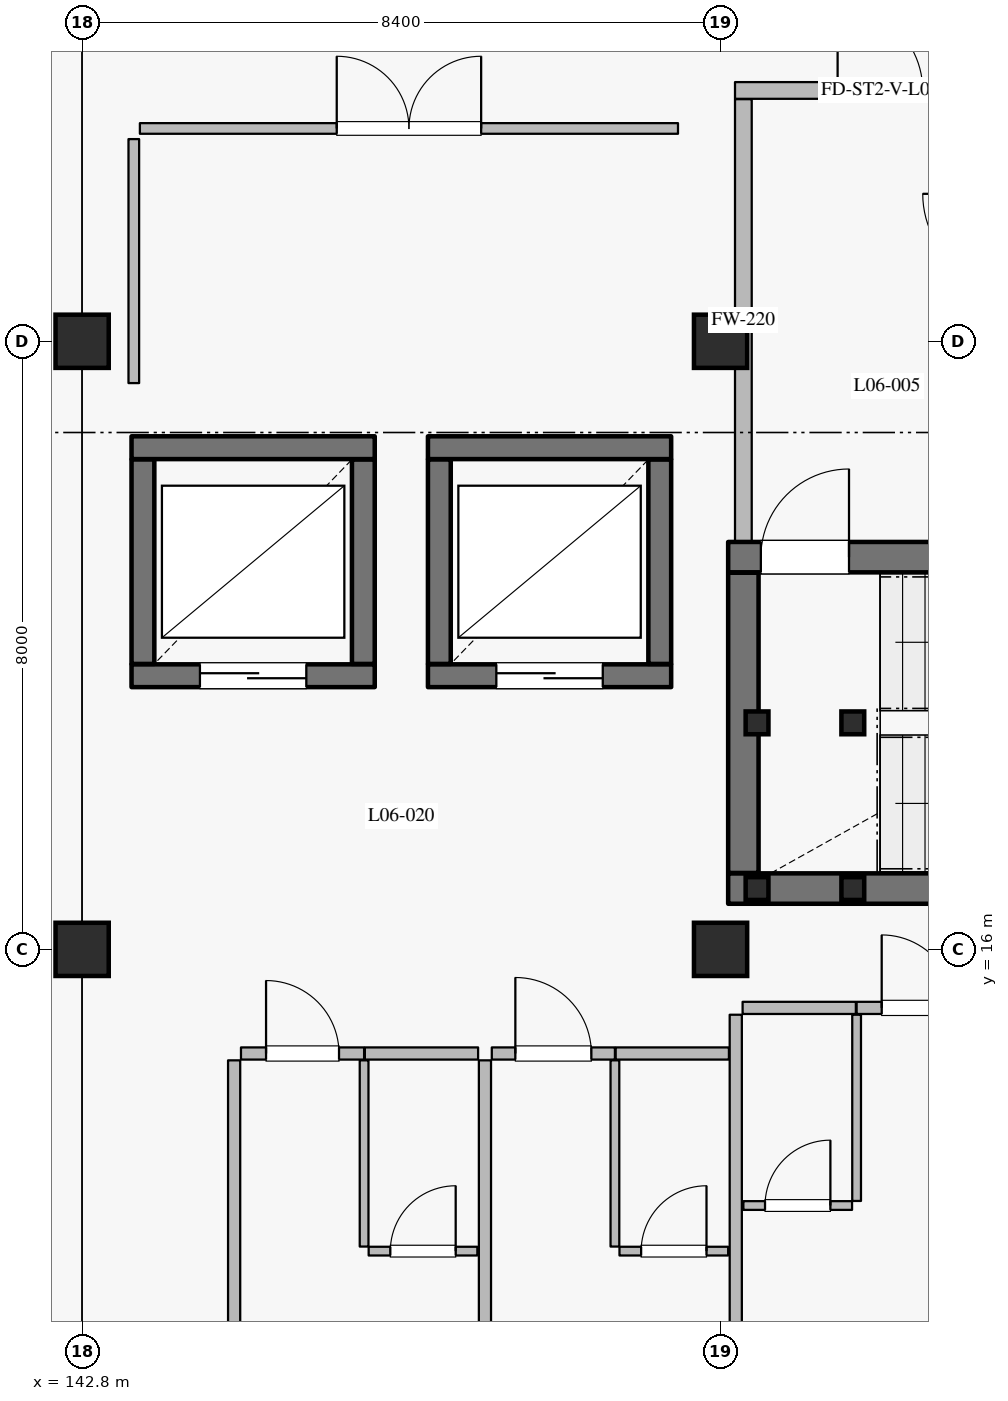
"""IFC4 building model, lengths in metres.
Left out: names, types, materials, properties, quantities, classifications, styles, units other than length and angle.
Written with IfcOpenShell. Run it as: python <this file> out.ifc"""

import sys

from ifc_helpers import new_model, si_unit, direction, frame, frame_2d, origin, origin_2d, place, context, subcontext, project, spatial, rectangle, hollow_rectangle, extrude, element, fill, save


model = new_model("IFC4")
c1 = context("Model", 3, precision=1e-05, world=origin(), true_north=direction((0.0, 1.0)))
c2 = subcontext(c1, "Body", "Model", "MODEL_VIEW")
j1 = project(units=[si_unit("LENGTHUNIT", "METRE"), si_unit("PLANEANGLEUNIT", "RADIAN")], contexts=[c1])
p1 = place(None, origin())
s1 = spatial("IfcSite", under=j1, at=p1, CompositionType="ELEMENT")
p2 = place(p1, origin())
s2 = spatial("IfcBuilding", under=s1, at=p2, CompositionType="ELEMENT")
p3 = place(p2, frame((0.0, 0.0, 28.8)))
s3 = spatial("IfcBuildingStorey", under=s2, at=p3, CompositionType="ELEMENT", Elevation=28.8)
for number, where, z_axis, x_axis in (
    (1, (142.8, 16.0, 0.0), (0.0, 0.0, 1.0), (1.0, 0.0, 0.0)),
    (2, (151.2, 24.0, 0.0), (0.0, 0.0, 1.0), (1.0, 0.0, 0.0)),
    (3, (142.8, 24.0, 0.0), (0.0, 0.0, 1.0), (1.0, 0.0, 0.0)),
    (4, (151.2, 16.0, 0.0), (0.0, 0.0, 1.0), (1.0, 0.0, 0.0)),
):
    element("IfcColumn", number, at=place(p3, frame(where, z_axis=z_axis, x_axis=x_axis)), inside=s3, PredefinedType="COLUMN", context=c2, shape_type="SweptSolid", body=[
        extrude(rectangle(XDim=0.7, YDim=0.7, at=origin_2d()), origin(), (0.0, 0.0, 1.0), 3.6),
    ])
p4 = place(p3, frame((143.45, 19.6, 0.0), z_axis=(0.0, 0.0, 1.0), x_axis=(1.0, 0.0, 0.0)))
e5 = element("IfcWall", 5, at=p4, inside=s3, PredefinedType="SHEAR", context=c2, shape_type="SweptSolid", body=[
    extrude(rectangle(XDim=3.2, YDim=0.3, at=frame_2d((1.6, 0.0))), origin(), (0.0, 0.0, 1.0), 3.365),
])
p5 = place(p4, frame((0.9, 0.0, 0.0)))
e6 = element("IfcOpeningElement", 6, at=p5, cuts=e5, PredefinedType="OPENING", context=c2, shape_type="SweptSolid", body=[
    extrude(rectangle(XDim=1.4, YDim=2.35, at=frame_2d((0.7, 1.175))), frame((0.0, 0.16, 0.0), z_axis=(0.0, -1.0, 0.0), x_axis=(1.0, 0.0, 0.0)), (0.0, 0.0, 1.0), 0.32),
])
p6 = place(p3, frame((146.5, 19.755, 0.0), z_axis=(0.0, 0.0, 1.0), x_axis=(0.0, 1.0, 0.0)))
e7 = element("IfcWall", 7, at=p6, inside=s3, PredefinedType="SHEAR", context=c2, shape_type="SweptSolid", body=[
    extrude(rectangle(XDim=2.69, YDim=0.3, at=frame_2d((1.345, 0.0))), origin(), (0.0, 0.0, 1.0), 3.365),
])
p7 = place(p3, frame((146.65, 22.6, 0.0), z_axis=(0.0, 0.0, 1.0), x_axis=(-1.0, 0.0, 0.0)))
e8 = element("IfcWall", 8, at=p7, inside=s3, PredefinedType="SHEAR", context=c2, shape_type="SweptSolid", body=[
    extrude(rectangle(XDim=3.2, YDim=0.3, at=frame_2d((1.6, 0.0))), origin(), (0.0, 0.0, 1.0), 3.365),
])
p8 = place(p3, frame((143.6, 22.445, 0.0), z_axis=(0.0, 0.0, 1.0), x_axis=(0.0, -1.0, 0.0)))
e9 = element("IfcWall", 9, at=p8, inside=s3, PredefinedType="SHEAR", context=c2, shape_type="SweptSolid", body=[
    extrude(rectangle(XDim=2.69, YDim=0.3, at=frame_2d((1.345, 0.0))), origin(), (0.0, 0.0, 1.0), 3.365),
])
p9 = place(p3, frame((147.35, 19.6, 0.0), z_axis=(0.0, 0.0, 1.0), x_axis=(1.0, 0.0, 0.0)))
e10 = element("IfcWall", 10, at=p9, inside=s3, PredefinedType="SHEAR", context=c2, shape_type="SweptSolid", body=[
    extrude(rectangle(XDim=3.2, YDim=0.3, at=frame_2d((1.6, 0.0))), origin(), (0.0, 0.0, 1.0), 3.365),
])
p10 = place(p9, frame((0.9, 0.0, 0.0)))
e11 = element("IfcOpeningElement", 11, at=p10, cuts=e10, PredefinedType="OPENING", context=c2, shape_type="SweptSolid", body=[
    extrude(rectangle(XDim=1.4, YDim=2.35, at=frame_2d((0.7, 1.175))), frame((0.0, 0.16, 0.0), z_axis=(0.0, -1.0, 0.0), x_axis=(1.0, 0.0, 0.0)), (0.0, 0.0, 1.0), 0.32),
])
p11 = place(p3, frame((150.4, 19.755, 0.0), z_axis=(0.0, 0.0, 1.0), x_axis=(0.0, 1.0, 0.0)))
e12 = element("IfcWall", 12, at=p11, inside=s3, PredefinedType="SHEAR", context=c2, shape_type="SweptSolid", body=[
    extrude(rectangle(XDim=2.69, YDim=0.3, at=frame_2d((1.345, 0.0))), origin(), (0.0, 0.0, 1.0), 3.365),
])
p12 = place(p3, frame((150.55, 22.6, 0.0), z_axis=(0.0, 0.0, 1.0), x_axis=(-1.0, 0.0, 0.0)))
e13 = element("IfcWall", 13, at=p12, inside=s3, PredefinedType="SHEAR", context=c2, shape_type="SweptSolid", body=[
    extrude(rectangle(XDim=3.2, YDim=0.3, at=frame_2d((1.6, 0.0))), origin(), (0.0, 0.0, 1.0), 3.365),
])
p13 = place(p3, frame((147.5, 22.445, 0.0), z_axis=(0.0, 0.0, 1.0), x_axis=(0.0, -1.0, 0.0)))
e14 = element("IfcWall", 14, at=p13, inside=s3, PredefinedType="SHEAR", context=c2, shape_type="SweptSolid", body=[
    extrude(rectangle(XDim=2.69, YDim=0.3, at=frame_2d((1.345, 0.0))), origin(), (0.0, 0.0, 1.0), 3.365),
])
p14 = place(p3, frame((151.3, 16.8, 0.0), z_axis=(0.0, 0.0, 1.0), x_axis=(1.0, 0.0, 0.0)))
e15 = element("IfcWall", 15, at=p14, inside=s3, PredefinedType="SHEAR", context=c2, shape_type="SweptSolid", body=[
    extrude(rectangle(XDim=8.2, YDim=0.4, at=frame_2d((4.1, 0.0))), origin(), (0.0, 0.0, 1.0), 3.365),
])
p15 = place(p3, frame((151.3, 21.16, 0.0), z_axis=(0.0, 0.0, 1.0), x_axis=(1.0, 0.0, 0.0)))
e16 = element("IfcWall", 16, at=p15, inside=s3, PredefinedType="SHEAR", context=c2, shape_type="SweptSolid", body=[
    extrude(rectangle(XDim=8.2, YDim=0.4, at=frame_2d((4.1, 0.0))), origin(), (0.0, 0.0, 1.0), 3.365),
])
p16 = place(p15, frame((0.43, 0.0, 0.0)))
e17 = element("IfcOpeningElement", 17, at=p16, cuts=e16, PredefinedType="OPENING", context=c2, shape_type="SweptSolid", body=[
    extrude(rectangle(XDim=1.16, YDim=2.2, at=frame_2d((0.58, 1.1))), frame((0.0, 0.21, 0.0), z_axis=(0.0, -1.0, 0.0), x_axis=(1.0, 0.0, 0.0)), (0.0, 0.0, 1.0), 0.42),
])
p17 = place(p3, frame((151.5, 17.005, 0.0), z_axis=(0.0, 0.0, 1.0), x_axis=(0.0, 1.0, 0.0)))
e18 = element("IfcWall", 18, at=p17, inside=s3, PredefinedType="SHEAR", context=c2, shape_type="SweptSolid", body=[
    extrude(rectangle(XDim=3.95, YDim=0.4, at=frame_2d((1.975, 0.0))), origin(), (0.0, 0.0, 1.0), 3.365),
])
p18 = place(p3, frame((151.5, 21.365, 0.0), z_axis=(0.0, 0.0, 1.0), x_axis=(0.0, 1.0, 0.0)))
e19 = element("IfcWall", 19, at=p18, inside=s3, PredefinedType="PARTITIONING", context=c2, shape_type="SweptSolid", body=[
    extrude(rectangle(XDim=5.82, YDim=0.22, at=frame_2d((2.91, 0.0))), origin(), (0.0, 0.0, 1.0), 3.365),
])
p19 = place(p3, frame((151.39, 27.3, 0.0), z_axis=(0.0, 0.0, 1.0), x_axis=(1.0, 0.0, 0.0)))
e20 = element("IfcWall", 20, at=p19, inside=s3, PredefinedType="PARTITIONING", context=c2, shape_type="SweptSolid", body=[
    extrude(rectangle(XDim=3.82, YDim=0.22, at=frame_2d((1.91, 0.0))), origin(), (0.0, 0.0, 1.0), 3.365),
])
p20 = place(p19, frame((1.35, 0.0, 0.0)))
e21 = element("IfcOpeningElement", 21, at=p20, cuts=e20, PredefinedType="OPENING", context=c2, shape_type="SweptSolid", body=[
    extrude(rectangle(XDim=1.12, YDim=2.2, at=frame_2d((0.56, 1.1))), frame((0.0, 0.12, 0.0), z_axis=(0.0, -1.0, 0.0), x_axis=(1.0, 0.0, 0.0)), (0.0, 0.0, 1.0), 0.24),
])
for number, where, z_axis, x_axis in (
    (22, (151.68, 16.8, 0.0), (0.0, 0.0, 1.0), (1.0, 0.0, 0.0)),
    (23, (151.68, 18.98, 0.0), (0.0, 0.0, 1.0), (1.0, 0.0, 0.0)),
    (24, (152.94, 16.8, 0.0), (0.0, 0.0, 1.0), (1.0, 0.0, 0.0)),
    (25, (152.94, 18.98, 0.0), (0.0, 0.0, 1.0), (1.0, 0.0, 0.0)),
):
    element("IfcColumn", number, at=place(p3, frame(where, z_axis=z_axis, x_axis=x_axis)), inside=s3, PredefinedType="COLUMN", context=c2, shape_type="SweptSolid", body=[
        extrude(hollow_rectangle(XDim=0.3, YDim=0.3, WallThickness=0.012, at=origin_2d()), origin(), (0.0, 0.0, 1.0), 3.42),
    ])
p21 = place(p3, frame((144.89, 14.63, 0.0), z_axis=(0.0, 0.0, 1.0), x_axis=(1.0, 0.0, 0.0)))
e26 = element("IfcWall", 26, at=p21, inside=s3, PredefinedType="PARTITIONING", context=c2, shape_type="SweptSolid", body=[
    extrude(rectangle(XDim=1.62, YDim=0.16, at=frame_2d((0.81, 0.0))), origin(), (0.0, 0.0, 1.0), 3.365),
])
p22 = place(p21, frame((0.33, 0.0, 0.0)))
e27 = element("IfcOpeningElement", 27, at=p22, cuts=e26, PredefinedType="OPENING", context=c2, shape_type="SweptSolid", body=[
    extrude(rectangle(XDim=0.96, YDim=2.2, at=frame_2d((0.48, 1.1))), frame((0.0, 0.09, 0.0), z_axis=(0.0, -1.0, 0.0), x_axis=(1.0, 0.0, 0.0)), (0.0, 0.0, 1.0), 0.18),
])
p23 = place(p3, frame((146.52, 14.63, 0.0), z_axis=(0.0, 0.0, 1.0), x_axis=(1.0, 0.0, 0.0)))
e28 = element("IfcWall", 28, at=p23, inside=s3, PredefinedType="PARTITIONING", context=c2, shape_type="SweptSolid", body=[
    extrude(rectangle(XDim=1.49, YDim=0.16, at=frame_2d((0.745, 0.0))), origin(), (0.0, 0.0, 1.0), 3.365),
])
p24 = place(p3, frame((146.51, 12.09, 0.0), z_axis=(0.0, 0.0, 1.0), x_axis=(0.0, 1.0, 0.0)))
e29 = element("IfcWall", 29, at=p24, inside=s3, PredefinedType="PARTITIONING", context=c2, shape_type="SweptSolid", body=[
    extrude(rectangle(XDim=2.45, YDim=0.115, at=frame_2d((1.225, 0.0))), origin(), (0.0, 0.0, 1.0), 3.365),
])
p25 = place(p3, frame((146.57, 12.03, 0.0), z_axis=(0.0, 0.0, 1.0), x_axis=(1.0, 0.0, 0.0)))
e30 = element("IfcWall", 30, at=p25, inside=s3, PredefinedType="PARTITIONING", context=c2, shape_type="SweptSolid", body=[
    extrude(rectangle(XDim=1.43, YDim=0.115, at=frame_2d((0.715, 0.0))), origin(), (0.0, 0.0, 1.0), 3.365),
])
p26 = place(p25, frame((0.285, 0.0, 0.0)))
e31 = element("IfcOpeningElement", 31, at=p26, cuts=e30, PredefinedType="OPENING", context=c2, shape_type="SweptSolid", body=[
    extrude(rectangle(XDim=0.86, YDim=2.12, at=frame_2d((0.43, 1.06))), frame((0.0, 0.067, 0.0), z_axis=(0.0, -1.0, 0.0), x_axis=(1.0, 0.0, 0.0)), (0.0, 0.0, 1.0), 0.135),
])
p27 = place(p3, frame((144.8, 5.39, 0.0), z_axis=(0.0, 0.0, 1.0), x_axis=(0.0, 1.0, 0.0)))
e32 = element("IfcWall", 32, at=p27, inside=s3, PredefinedType="PARTITIONING", context=c2, shape_type="SweptSolid", body=[
    extrude(rectangle(XDim=9.15, YDim=0.16, at=frame_2d((4.575, 0.0))), origin(), (0.0, 0.0, 1.0), 3.365),
])
p28 = place(p3, frame((148.19, 14.63, 0.0), z_axis=(0.0, 0.0, 1.0), x_axis=(1.0, 0.0, 0.0)))
e33 = element("IfcWall", 33, at=p28, inside=s3, PredefinedType="PARTITIONING", context=c2, shape_type="SweptSolid", body=[
    extrude(rectangle(XDim=1.62, YDim=0.16, at=frame_2d((0.81, 0.0))), origin(), (0.0, 0.0, 1.0), 3.365),
])
p29 = place(p28, frame((0.31, 0.0, 0.0)))
e34 = element("IfcOpeningElement", 34, at=p29, cuts=e33, PredefinedType="OPENING", context=c2, shape_type="SweptSolid", body=[
    extrude(rectangle(XDim=1.0, YDim=2.25, at=frame_2d((0.5, 1.125))), frame((0.0, 0.09, 0.0), z_axis=(0.0, -1.0, 0.0), x_axis=(1.0, 0.0, 0.0)), (0.0, 0.0, 1.0), 0.18),
])
p30 = place(p3, frame((149.82, 14.63, 0.0), z_axis=(0.0, 0.0, 1.0), x_axis=(1.0, 0.0, 0.0)))
e35 = element("IfcWall", 35, at=p30, inside=s3, PredefinedType="PARTITIONING", context=c2, shape_type="SweptSolid", body=[
    extrude(rectangle(XDim=1.49, YDim=0.16, at=frame_2d((0.745, 0.0))), origin(), (0.0, 0.0, 1.0), 3.365),
])
p31 = place(p3, frame((149.81, 12.09, 0.0), z_axis=(0.0, 0.0, 1.0), x_axis=(0.0, 1.0, 0.0)))
e36 = element("IfcWall", 36, at=p31, inside=s3, PredefinedType="PARTITIONING", context=c2, shape_type="SweptSolid", body=[
    extrude(rectangle(XDim=2.45, YDim=0.115, at=frame_2d((1.225, 0.0))), origin(), (0.0, 0.0, 1.0), 3.365),
])
p32 = place(p3, frame((149.87, 12.03, 0.0), z_axis=(0.0, 0.0, 1.0), x_axis=(1.0, 0.0, 0.0)))
e37 = element("IfcWall", 37, at=p32, inside=s3, PredefinedType="PARTITIONING", context=c2, shape_type="SweptSolid", body=[
    extrude(rectangle(XDim=1.43, YDim=0.115, at=frame_2d((0.715, 0.0))), origin(), (0.0, 0.0, 1.0), 3.365),
])
p33 = place(p32, frame((0.285, 0.0, 0.0)))
e38 = element("IfcOpeningElement", 38, at=p33, cuts=e37, PredefinedType="OPENING", context=c2, shape_type="SweptSolid", body=[
    extrude(rectangle(XDim=0.86, YDim=2.12, at=frame_2d((0.43, 1.06))), frame((0.0, 0.067, 0.0), z_axis=(0.0, -1.0, 0.0), x_axis=(1.0, 0.0, 0.0)), (0.0, 0.0, 1.0), 0.135),
])
p34 = place(p3, frame((148.1, 8.34, 0.0), z_axis=(0.0, 0.0, 1.0), x_axis=(0.0, 1.0, 0.0)))
e39 = element("IfcWall", 39, at=p34, inside=s3, PredefinedType="PARTITIONING", context=c2, shape_type="SweptSolid", body=[
    extrude(rectangle(XDim=6.2, YDim=0.16, at=frame_2d((3.1, 0.0))), origin(), (0.0, 0.0, 1.0), 3.365),
])
p35 = place(p3, frame((151.49, 15.23, 0.0), z_axis=(0.0, 0.0, 1.0), x_axis=(1.0, 0.0, 0.0)))
e40 = element("IfcWall", 40, at=p35, inside=s3, PredefinedType="PARTITIONING", context=c2, shape_type="SweptSolid", body=[
    extrude(rectangle(XDim=1.49, YDim=0.16, at=frame_2d((0.745, 0.0))), origin(), (0.0, 0.0, 1.0), 3.365),
])
p36 = place(p3, frame((152.99, 15.23, 0.0), z_axis=(0.0, 0.0, 1.0), x_axis=(1.0, 0.0, 0.0)))
e41 = element("IfcWall", 41, at=p36, inside=s3, PredefinedType="PARTITIONING", context=c2, shape_type="SweptSolid", body=[
    extrude(rectangle(XDim=1.62, YDim=0.16, at=frame_2d((0.81, 0.0))), origin(), (0.0, 0.0, 1.0), 3.365),
])
p37 = place(p36, frame((0.33, 0.0, 0.0)))
e42 = element("IfcOpeningElement", 42, at=p37, cuts=e41, PredefinedType="OPENING", context=c2, shape_type="SweptSolid", body=[
    extrude(rectangle(XDim=0.96, YDim=2.2, at=frame_2d((0.48, 1.1))), frame((0.0, 0.09, 0.0), z_axis=(0.0, -1.0, 0.0), x_axis=(1.0, 0.0, 0.0)), (0.0, 0.0, 1.0), 0.18),
])
p38 = place(p3, frame((152.99, 12.69, 0.0), z_axis=(0.0, 0.0, 1.0), x_axis=(0.0, 1.0, 0.0)))
e43 = element("IfcWall", 43, at=p38, inside=s3, PredefinedType="PARTITIONING", context=c2, shape_type="SweptSolid", body=[
    extrude(rectangle(XDim=2.45, YDim=0.115, at=frame_2d((1.225, 0.0))), origin(), (0.0, 0.0, 1.0), 3.365),
])
p39 = place(p3, frame((151.5, 12.63, 0.0), z_axis=(0.0, 0.0, 1.0), x_axis=(1.0, 0.0, 0.0)))
e44 = element("IfcWall", 44, at=p39, inside=s3, PredefinedType="PARTITIONING", context=c2, shape_type="SweptSolid", body=[
    extrude(rectangle(XDim=1.43, YDim=0.115, at=frame_2d((0.715, 0.0))), origin(), (0.0, 0.0, 1.0), 3.365),
])
p40 = place(p39, frame((0.285, 0.0, 0.0)))
e45 = element("IfcOpeningElement", 45, at=p40, cuts=e44, PredefinedType="OPENING", context=c2, shape_type="SweptSolid", body=[
    extrude(rectangle(XDim=0.86, YDim=2.12, at=frame_2d((0.43, 1.06))), frame((0.0, 0.067, 0.0), z_axis=(0.0, -1.0, 0.0), x_axis=(1.0, 0.0, 0.0)), (0.0, 0.0, 1.0), 0.135),
])
p41 = place(p3, frame((151.4, 8.34, 0.0), z_axis=(0.0, 0.0, 1.0), x_axis=(0.0, 1.0, 0.0)))
e46 = element("IfcWall", 46, at=p41, inside=s3, PredefinedType="PARTITIONING", context=c2, shape_type="SweptSolid", body=[
    extrude(rectangle(XDim=6.8, YDim=0.16, at=frame_2d((3.4, 0.0))), origin(), (0.0, 0.0, 1.0), 2.73),
])
p42 = place(p3, frame((143.56, 26.8, 0.0), z_axis=(0.0, 0.0, 1.0), x_axis=(1.0, 0.0, 0.0)))
e47 = element("IfcWall", 47, at=p42, inside=s3, PredefinedType="PARTITIONING", context=c2, shape_type="SweptSolid", body=[
    extrude(rectangle(XDim=7.08, YDim=0.14, at=frame_2d((3.54, 0.0))), origin(), (0.0, 0.0, 1.0), 3.365),
])
p43 = place(p42, frame((2.59, 0.0, 0.0)))
e48 = element("IfcOpeningElement", 48, at=p43, cuts=e47, PredefinedType="OPENING", context=c2, shape_type="SweptSolid", body=[
    extrude(rectangle(XDim=1.9, YDim=2.4, at=frame_2d((0.95, 1.2))), frame((0.0, 0.08, 0.0), z_axis=(0.0, -1.0, 0.0), x_axis=(1.0, 0.0, 0.0)), (0.0, 0.0, 1.0), 0.16),
])
p44 = place(p3, frame((143.48, 23.45, 0.0), z_axis=(0.0, 0.0, 1.0), x_axis=(0.0, 1.0, 0.0)))
e49 = element("IfcWall", 49, at=p44, inside=s3, PredefinedType="PARTITIONING", context=c2, shape_type="SweptSolid", body=[
    extrude(rectangle(XDim=3.21, YDim=0.14, at=frame_2d((1.605, 0.0))), origin(), (0.0, 0.0, 1.0), 3.365),
])
p45 = place(p5, origin())
e50 = element("IfcDoor", 50, at=p45, inside=s3, OperationType="DOUBLE_DOOR_SLIDING", PredefinedType="DOOR", context=c2, shape_type="SweptSolid", body=[
    extrude(rectangle(XDim=1.4, YDim=2.35, at=frame_2d((0.7, 1.175))), frame((0.0, 0.025, 0.0), z_axis=(0.0, -1.0, 0.0), x_axis=(1.0, 0.0, 0.0)), (0.0, 0.0, 1.0), 0.05),
])
fill(e6, e50)
p46 = place(p10, origin())
e51 = element("IfcDoor", 51, at=p46, inside=s3, OperationType="DOUBLE_DOOR_SLIDING", PredefinedType="DOOR", context=c2, shape_type="SweptSolid", body=[
    extrude(rectangle(XDim=1.4, YDim=2.35, at=frame_2d((0.7, 1.175))), frame((0.0, 0.025, 0.0), z_axis=(0.0, -1.0, 0.0), x_axis=(1.0, 0.0, 0.0)), (0.0, 0.0, 1.0), 0.05),
])
fill(e11, e51)
p47 = place(p16, origin())
e52 = element("IfcDoor", 52, at=p47, inside=s3, OperationType="SINGLE_SWING_RIGHT", PredefinedType="DOOR", context=c2, shape_type="SweptSolid", body=[
    extrude(rectangle(XDim=1.16, YDim=2.2, at=frame_2d((0.58, 1.1))), frame((0.0, 0.025, 0.0), z_axis=(0.0, -1.0, 0.0), x_axis=(1.0, 0.0, 0.0)), (0.0, 0.0, 1.0), 0.05),
])
fill(e17, e52)
p48 = place(p20, origin())
e53 = element("IfcDoor", 53, at=p48, inside=s3, OperationType="SINGLE_SWING_LEFT", PredefinedType="DOOR", context=c2, shape_type="SweptSolid", body=[
    extrude(rectangle(XDim=1.12, YDim=2.2, at=frame_2d((0.56, 1.1))), frame((0.0, 0.025, 0.0), z_axis=(0.0, -1.0, 0.0), x_axis=(1.0, 0.0, 0.0)), (0.0, 0.0, 1.0), 0.05),
])
fill(e21, e53)
p49 = place(p22, origin())
e54 = element("IfcDoor", 54, at=p49, inside=s3, OperationType="SINGLE_SWING_LEFT", PredefinedType="DOOR", context=c2, shape_type="SweptSolid", body=[
    extrude(rectangle(XDim=0.96, YDim=2.2, at=frame_2d((0.48, 1.1))), frame((0.0, 0.025, 0.0), z_axis=(0.0, -1.0, 0.0), x_axis=(1.0, 0.0, 0.0)), (0.0, 0.0, 1.0), 0.05),
])
fill(e27, e54)
p50 = place(p26, origin())
e55 = element("IfcDoor", 55, at=p50, inside=s3, OperationType="SINGLE_SWING_RIGHT", PredefinedType="DOOR", context=c2, shape_type="SweptSolid", body=[
    extrude(rectangle(XDim=0.86, YDim=2.12, at=frame_2d((0.43, 1.06))), frame((0.0, 0.025, 0.0), z_axis=(0.0, -1.0, 0.0), x_axis=(1.0, 0.0, 0.0)), (0.0, 0.0, 1.0), 0.05),
])
fill(e31, e55)
p51 = place(p29, origin())
e56 = element("IfcDoor", 56, at=p51, inside=s3, OperationType="SINGLE_SWING_LEFT", PredefinedType="DOOR", context=c2, shape_type="SweptSolid", body=[
    extrude(rectangle(XDim=1.0, YDim=2.25, at=frame_2d((0.5, 1.125))), frame((0.0, 0.025, 0.0), z_axis=(0.0, -1.0, 0.0), x_axis=(1.0, 0.0, 0.0)), (0.0, 0.0, 1.0), 0.05),
])
fill(e34, e56)
p52 = place(p33, origin())
e57 = element("IfcDoor", 57, at=p52, inside=s3, OperationType="SINGLE_SWING_RIGHT", PredefinedType="DOOR", context=c2, shape_type="SweptSolid", body=[
    extrude(rectangle(XDim=0.86, YDim=2.12, at=frame_2d((0.43, 1.06))), frame((0.0, 0.025, 0.0), z_axis=(0.0, -1.0, 0.0), x_axis=(1.0, 0.0, 0.0)), (0.0, 0.0, 1.0), 0.05),
])
fill(e38, e57)
p53 = place(p37, origin())
e58 = element("IfcDoor", 58, at=p53, inside=s3, OperationType="SINGLE_SWING_LEFT", PredefinedType="DOOR", context=c2, shape_type="SweptSolid", body=[
    extrude(rectangle(XDim=0.96, YDim=2.2, at=frame_2d((0.48, 1.1))), frame((0.0, 0.025, 0.0), z_axis=(0.0, -1.0, 0.0), x_axis=(1.0, 0.0, 0.0)), (0.0, 0.0, 1.0), 0.05),
])
fill(e42, e58)
p54 = place(p40, origin())
e59 = element("IfcDoor", 59, at=p54, inside=s3, OperationType="SINGLE_SWING_RIGHT", PredefinedType="DOOR", context=c2, shape_type="SweptSolid", body=[
    extrude(rectangle(XDim=0.86, YDim=2.12, at=frame_2d((0.43, 1.06))), frame((0.0, 0.025, 0.0), z_axis=(0.0, -1.0, 0.0), x_axis=(1.0, 0.0, 0.0)), (0.0, 0.0, 1.0), 0.05),
])
fill(e45, e59)
p55 = place(p43, origin())
e60 = element("IfcDoor", 60, at=p55, inside=s3, OperationType="DOUBLE_DOOR_SINGLE_SWING", PredefinedType="DOOR", context=c2, shape_type="SweptSolid", body=[
    extrude(rectangle(XDim=1.9, YDim=2.4, at=frame_2d((0.95, 1.2))), frame((0.0, 0.025, 0.0), z_axis=(0.0, -1.0, 0.0), x_axis=(1.0, 0.0, 0.0)), (0.0, 0.0, 1.0), 0.05),
])
fill(e48, e60)
save(model, sys.argv[1])
